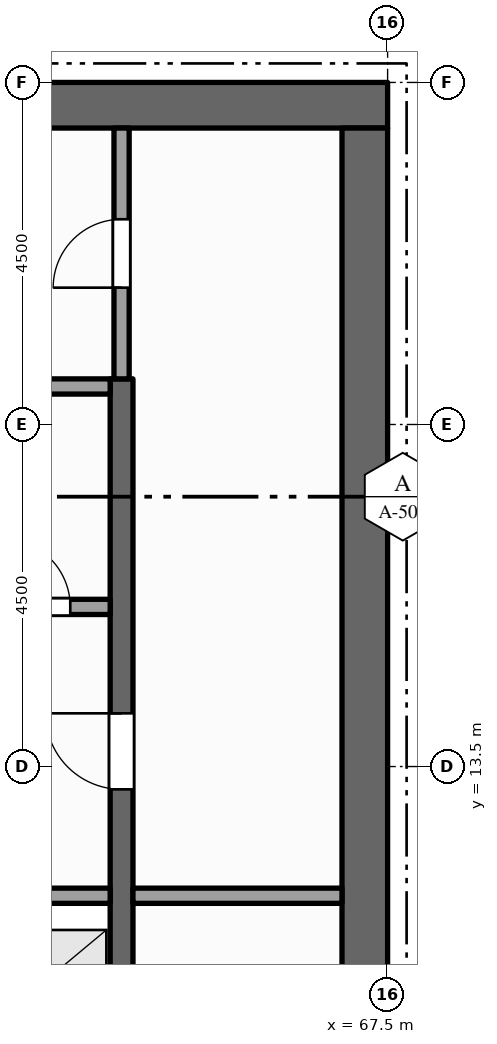
"""IFC4 building model, lengths in metres.
Left out: names, types, materials, properties, quantities, classifications, styles, units other than length and angle.
Written with IfcOpenShell. Run it as: python <this file> out.ifc"""

import sys

from ifc_helpers import new_model, si_unit, direction, frame, frame_2d, origin, place, context, subcontext, project, spatial, rectangle, extrude, element, fill, save


model = new_model("IFC4")
c1 = context("Model", 3, precision=1e-05, world=origin(), true_north=direction((0.0, 1.0)))
c2 = subcontext(c1, "Body", "Model", "MODEL_VIEW")
j1 = project(units=[si_unit("LENGTHUNIT", "METRE"), si_unit("PLANEANGLEUNIT", "RADIAN")], contexts=[c1])
p1 = place(None, origin())
s1 = spatial("IfcSite", under=j1, at=p1, CompositionType="ELEMENT")
p2 = place(p1, origin())
s2 = spatial("IfcBuilding", under=s1, at=p2, CompositionType="ELEMENT")
p3 = place(p2, frame((0.0, 0.0, 309.5)))
s3 = spatial("IfcBuildingStorey", under=s2, at=p3, CompositionType="ELEMENT", Elevation=309.5)
p4 = place(p3, frame((54.0, 22.2, -0.15), z_axis=(0.0, 0.0, 1.0), x_axis=(1.0, 0.0, 0.0)))
e1 = element("IfcWall", 1, at=p4, inside=s3, PredefinedType="SHEAR", context=c2, shape_type="SweptSolid", body=[
    extrude(rectangle(XDim=13.5, YDim=0.6, at=frame_2d((6.75, 0.0))), origin(), (0.0, 0.0, 1.0), 4.5),
])
p5 = place(p3, frame((67.2, 0.6, -0.15), z_axis=(0.0, 0.0, 1.0), x_axis=(0.0, 1.0, 0.0)))
e2 = element("IfcWall", 2, at=p5, inside=s3, PredefinedType="SHEAR", context=c2, shape_type="SweptSolid", body=[
    extrude(rectangle(XDim=21.3, YDim=0.6, at=frame_2d((10.65, 0.0))), origin(), (0.0, 0.0, 1.0), 4.5),
])
p6 = place(p3, frame((64.0, 4.1, 0.0), z_axis=(0.0, 0.0, 1.0), x_axis=(0.0, 1.0, 0.0)))
e3 = element("IfcWall", 3, at=p6, inside=s3, PredefinedType="SHEAR", context=c2, shape_type="SweptSolid", body=[
    extrude(rectangle(XDim=14.5, YDim=0.3, at=frame_2d((7.25, 0.0))), origin(), (0.0, 0.0, 1.0), 4.35),
])
p7 = place(p6, frame((3.4, 0.0, 0.0)))
e4 = element("IfcOpeningElement", 4, at=p7, cuts=e3, PredefinedType="OPENING", context=c2, shape_type="SweptSolid", body=[
    extrude(rectangle(XDim=1.0, YDim=2.1, at=frame_2d((0.5, 1.05))), frame((0.0, 0.16, 0.0), z_axis=(0.0, -1.0, 0.0), x_axis=(1.0, 0.0, 0.0)), (0.0, 0.0, 1.0), 0.32),
])
p8 = place(p6, frame((9.1, 0.0, 0.0)))
e5 = element("IfcOpeningElement", 5, at=p8, cuts=e3, PredefinedType="OPENING", context=c2, shape_type="SweptSolid", body=[
    extrude(rectangle(XDim=1.0, YDim=2.1, at=frame_2d((0.5, 1.05))), frame((0.0, 0.16, 0.0), z_axis=(0.0, -1.0, 0.0), x_axis=(1.0, 0.0, 0.0)), (0.0, 0.0, 1.0), 0.32),
])
p9 = place(p3, frame((64.0, 18.6, 0.0), z_axis=(0.0, 0.0, 1.0), x_axis=(0.0, 1.0, 0.0)))
e6 = element("IfcWall", 6, at=p9, inside=s3, PredefinedType="PARTITIONING", context=c2, shape_type="SweptSolid", body=[
    extrude(rectangle(XDim=3.3, YDim=0.2, at=frame_2d((1.65, 0.0))), origin(), (0.0, 0.0, 1.0), 4.35),
])
p10 = place(p9, frame((1.2, 0.0, 0.0)))
e7 = element("IfcOpeningElement", 7, at=p10, cuts=e6, PredefinedType="OPENING", context=c2, shape_type="SweptSolid", body=[
    extrude(rectangle(XDim=0.9, YDim=2.1, at=frame_2d((0.45, 1.05))), frame((0.0, 0.11, 0.0), z_axis=(0.0, -1.0, 0.0), x_axis=(1.0, 0.0, 0.0)), (0.0, 0.0, 1.0), 0.22),
])
p11 = place(p3, frame((61.9, 11.8, 0.0), z_axis=(0.0, 0.0, 1.0), x_axis=(1.0, 0.0, 0.0)))
e8 = element("IfcWall", 8, at=p11, inside=s3, PredefinedType="SOLIDWALL", context=c2, shape_type="SweptSolid", body=[
    extrude(rectangle(XDim=1.95, YDim=0.2, at=frame_2d((0.975, 0.0))), origin(), (0.0, 0.0, 1.0), 4.35),
])
p12 = place(p3, frame((64.15, 11.8, 0.0), z_axis=(0.0, 0.0, 1.0), x_axis=(1.0, 0.0, 0.0)))
e9 = element("IfcWall", 9, at=p12, inside=s3, PredefinedType="PARTITIONING", context=c2, shape_type="SweptSolid", body=[
    extrude(rectangle(XDim=2.75, YDim=0.2, at=frame_2d((1.375, 0.0))), origin(), (0.0, 0.0, 1.0), 4.35),
])
p13 = place(p3, frame((61.9, 15.6, 0.0), z_axis=(0.0, 0.0, 1.0), x_axis=(1.0, 0.0, 0.0)))
e10 = element("IfcWall", 10, at=p13, inside=s3, PredefinedType="PARTITIONING", context=c2, shape_type="SweptSolid", body=[
    extrude(rectangle(XDim=1.95, YDim=0.2, at=frame_2d((0.975, 0.0))), origin(), (0.0, 0.0, 1.0), 4.35),
])
p14 = place(p13, frame((0.525, 0.0, 0.0)))
e11 = element("IfcOpeningElement", 11, at=p14, cuts=e10, PredefinedType="OPENING", context=c2, shape_type="SweptSolid", body=[
    extrude(rectangle(XDim=0.9, YDim=2.1, at=frame_2d((0.45, 1.05))), frame((0.0, 0.11, 0.0), z_axis=(0.0, -1.0, 0.0), x_axis=(1.0, 0.0, 0.0)), (0.0, 0.0, 1.0), 0.22),
])
p15 = place(p3, frame((61.9, 18.5, 0.0), z_axis=(0.0, 0.0, 1.0), x_axis=(1.0, 0.0, 0.0)))
e12 = element("IfcWall", 12, at=p15, inside=s3, PredefinedType="PARTITIONING", context=c2, shape_type="SweptSolid", body=[
    extrude(rectangle(XDim=1.95, YDim=0.2, at=frame_2d((0.975, 0.0))), origin(), (0.0, 0.0, 1.0), 4.35),
])
p16 = place(p8, origin())
e13 = element("IfcDoor", 13, at=p16, inside=s3, OperationType="SINGLE_SWING_RIGHT", PredefinedType="DOOR", context=c2, shape_type="SweptSolid", body=[
    extrude(rectangle(XDim=1.0, YDim=2.1, at=frame_2d((0.5, 1.05))), frame((0.0, 0.025, 0.0), z_axis=(0.0, -1.0, 0.0), x_axis=(1.0, 0.0, 0.0)), (0.0, 0.0, 1.0), 0.05),
])
fill(e5, e13)
p17 = place(p10, origin())
e14 = element("IfcDoor", 14, at=p17, inside=s3, OperationType="SINGLE_SWING_LEFT", PredefinedType="DOOR", context=c2, shape_type="SweptSolid", body=[
    extrude(rectangle(XDim=0.9, YDim=2.1, at=frame_2d((0.45, 1.05))), frame((0.0, 0.025, 0.0), z_axis=(0.0, -1.0, 0.0), x_axis=(1.0, 0.0, 0.0)), (0.0, 0.0, 1.0), 0.05),
])
fill(e7, e14)
p18 = place(p14, origin())
e15 = element("IfcDoor", 15, at=p18, inside=s3, OperationType="SINGLE_SWING_LEFT", PredefinedType="DOOR", context=c2, shape_type="SweptSolid", body=[
    extrude(rectangle(XDim=0.9, YDim=2.1, at=frame_2d((0.45, 1.05))), frame((0.0, 0.025, 0.0), z_axis=(0.0, -1.0, 0.0), x_axis=(1.0, 0.0, 0.0)), (0.0, 0.0, 1.0), 0.05),
])
fill(e11, e15)
save(model, sys.argv[1])
